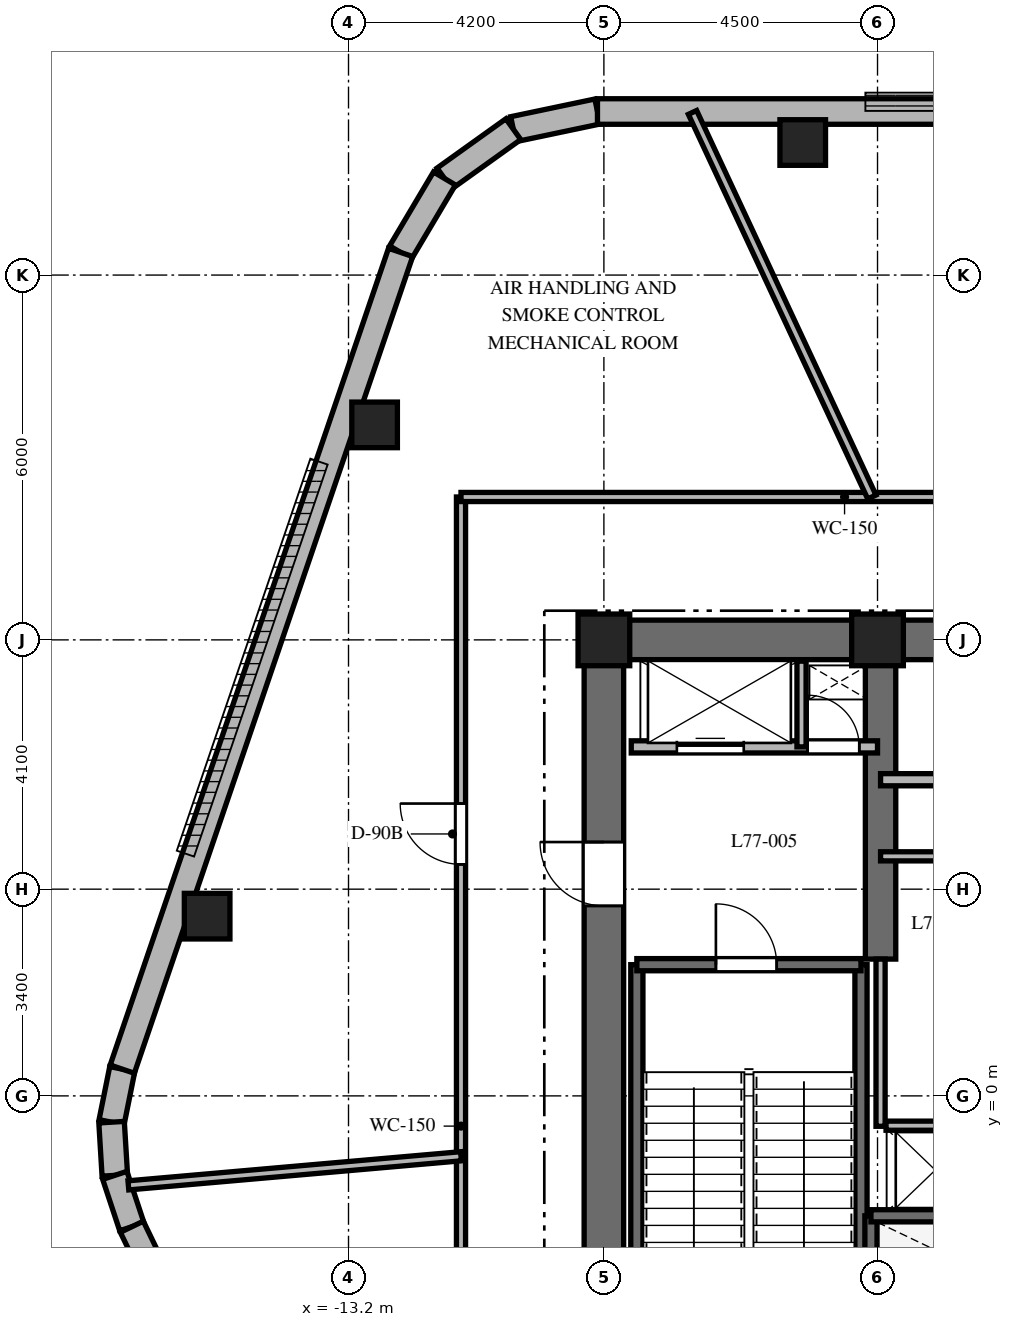
"""IFC4 building model, lengths in metres.
Left out: names, types, materials, properties, quantities, classifications, styles, units other than length and angle.
Written with IfcOpenShell. Run it as: python <this file> out.ifc"""

import sys

from ifc_helpers import new_model, si_unit, direction, frame, frame_2d, origin, origin_2d, place, context, subcontext, project, spatial, rectangle, extrude, element, fill, save


model = new_model("IFC4")
c1 = context("Model", 3, precision=1e-05, world=origin(), true_north=direction((0.0, 1.0)))
c2 = subcontext(c1, "Body", "Model", "MODEL_VIEW")
j1 = project(units=[si_unit("LENGTHUNIT", "METRE"), si_unit("PLANEANGLEUNIT", "RADIAN")], contexts=[c1])
p1 = place(None, origin())
s1 = spatial("IfcSite", under=j1, at=p1, CompositionType="ELEMENT")
p2 = place(p1, origin())
s2 = spatial("IfcBuilding", under=s1, at=p2, CompositionType="ELEMENT")
p3 = place(p2, frame((0.0, 0.0, 310.4)))
s3 = spatial("IfcBuildingStorey", under=s2, at=p3, CompositionType="ELEMENT", Elevation=310.4)
p4 = place(p3, frame((-9.325, 7.5, 0.0), z_axis=(0.0, 0.0, 1.0), x_axis=(1.0, 0.0, 0.0)))
e1 = element("IfcWall", 1, at=p4, inside=s3, PredefinedType="SHEAR", context=c2, shape_type="SweptSolid", body=[
    extrude(rectangle(XDim=9.375, YDim=0.65, at=frame_2d((4.688, 0.0))), origin(), (0.0, 0.0, 1.0), 5.5),
])
p5 = place(p3, frame((-9.0, -7.175, 0.0), z_axis=(0.0, 0.0, 1.0), x_axis=(0.0, 1.0, 0.0)))
e2 = element("IfcWall", 2, at=p5, inside=s3, PredefinedType="SHEAR", context=c2, shape_type="SweptSolid", body=[
    extrude(rectangle(XDim=14.35, YDim=0.65, at=frame_2d((7.175, 0.0))), origin(), (0.0, 0.0, 1.0), 5.5),
])
p6 = place(p5, frame((10.3, 0.0, 0.0)))
e3 = element("IfcOpeningElement", 3, at=p6, cuts=e2, PredefinedType="OPENING", context=c2, shape_type="SweptSolid", body=[
    extrude(rectangle(XDim=1.05, YDim=2.15, at=frame_2d((0.525, 1.075))), frame((0.0, 0.335, 0.0), z_axis=(0.0, -1.0, 0.0), x_axis=(1.0, 0.0, 0.0)), (0.0, 0.0, 1.0), 0.67),
])
p7 = place(p3, frame((-4.45, 2.25, 0.0), z_axis=(0.0, 0.0, 1.0), x_axis=(0.0, 1.0, 0.0)))
e4 = element("IfcWall", 4, at=p7, inside=s3, PredefinedType="SHEAR", context=c2, shape_type="SweptSolid", body=[
    extrude(rectangle(XDim=4.925, YDim=0.5, at=frame_2d((2.462, 0.0))), origin(), (0.0, 0.0, 1.0), 5.5),
])
for number, where, z_axis, x_axis in (
    (5, (-8.458, -6.985, 0.0), (0.0, 0.0, 1.0), (0.0, 1.0, 0.0)),
    (6, (-4.772, -6.985, 0.0), (0.0, 0.0, 1.0), (0.0, 1.0, 0.0)),
):
    element("IfcWall", number, at=place(p3, frame(where, z_axis=z_axis, x_axis=x_axis)), inside=s3, PredefinedType="SHEAR", context=c2, shape_type="SweptSolid", body=[
        extrude(rectangle(XDim=9.143, YDim=0.2, at=frame_2d((4.572, 0.0))), origin(), (0.0, 0.0, 1.0), 5.5),
    ])
p8 = place(p3, frame((-8.458, 2.158, 0.0), z_axis=(0.0, 0.0, 1.0), x_axis=(1.0, 0.0, 0.0)))
e7 = element("IfcWall", 7, at=p8, inside=s3, PredefinedType="SHEAR", context=c2, shape_type="SweptSolid", body=[
    extrude(rectangle(XDim=3.686, YDim=0.2, at=frame_2d((1.843, 0.0))), origin(), (0.0, 0.0, 1.0), 5.5),
])
p9 = place(p8, frame((1.3, 0.0, 0.0)))
e8 = element("IfcOpeningElement", 8, at=p9, cuts=e7, PredefinedType="OPENING", context=c2, shape_type="SweptSolid", body=[
    extrude(rectangle(XDim=1.0, YDim=2.15, at=frame_2d((0.5, 1.075))), frame((0.0, 0.11, 0.0), z_axis=(0.0, -1.0, 0.0), x_axis=(1.0, 0.0, 0.0)), (0.0, 0.0, 1.0), 0.22),
])
p10 = place(p3, frame((-4.608, -5.658, 0.0), z_axis=(0.0, 0.0, 1.0), x_axis=(0.0, 1.0, 0.0)))
e9 = element("IfcWall", 9, at=p10, inside=s3, PredefinedType="SHEAR", context=c2, shape_type="SweptSolid", body=[
    extrude(rectangle(XDim=3.686, YDim=0.2, at=frame_2d((1.843, 0.0))), origin(), (0.0, 0.0, 1.0), 5.5),
])
p11 = place(p3, frame((-4.608, -1.972, 0.0), z_axis=(0.0, 0.0, 1.0), x_axis=(1.0, 0.0, 0.0)))
e10 = element("IfcWall", 10, at=p11, inside=s3, PredefinedType="SHEAR", context=c2, shape_type="SweptSolid", body=[
    extrude(rectangle(XDim=9.166, YDim=0.2, at=frame_2d((4.583, 0.0))), origin(), (0.0, 0.0, 1.0), 5.5),
])
for number, where, z_axis, x_axis in (
    (11, (-4.5, 7.5, 0.0), (0.0, 0.0, 1.0), (1.0, 0.0, 0.0)),
    (12, (-9.0, 7.5, 0.0), (0.0, 0.0, 1.0), (1.0, 0.0, 0.0)),
):
    element("IfcColumn", number, at=place(p3, frame(where, z_axis=z_axis, x_axis=x_axis)), inside=s3, PredefinedType="COLUMN", context=c2, shape_type="SweptSolid", body=[
        extrude(rectangle(XDim=0.85, YDim=0.85, at=origin_2d()), origin(), (0.0, 0.0, 1.0), 5.5),
    ])
for number, where, z_axis, x_axis in (
    (13, (-5.73, 15.68, 0.0), (0.0, 0.0, 1.0), (1.0, 0.0, 0.0)),
    (14, (-12.771, 11.036, 0.0), (0.0, 0.0, 1.0), (1.0, 0.0, 0.0)),
    (15, (-15.525, 2.956, 0.0), (0.0, 0.0, 1.0), (1.0, 0.0, 0.0)),
):
    element("IfcColumn", number, at=place(p3, frame(where, z_axis=z_axis, x_axis=x_axis)), inside=s3, PredefinedType="COLUMN", context=c2, shape_type="SweptSolid", body=[
        extrude(rectangle(XDim=0.75, YDim=0.75, at=origin_2d()), origin(), (0.0, 0.0, 1.0), 5.5),
    ])
p12 = place(p3, frame((-9.106, 16.19, 0.0), z_axis=(0.0, 0.0, 1.0), x_axis=(-0.978670507127, -0.205436215114, 0.0)))
e16 = element("IfcWall", 16, at=p12, inside=s3, PredefinedType="SOLIDWALL", context=c2, shape_type="SweptSolid", body=[
    extrude(rectangle(XDim=1.414, YDim=0.42, at=frame_2d((0.707, 0.0))), origin(), (0.0, 0.0, 1.0), 5.18),
])
p13 = place(p3, frame((-10.49, 15.899, 0.0), z_axis=(0.0, 0.0, 1.0), x_axis=(-0.813104912719, -0.58211717112, 0.0)))
e17 = element("IfcWall", 17, at=p13, inside=s3, PredefinedType="SOLIDWALL", context=c2, shape_type="SweptSolid", body=[
    extrude(rectangle(XDim=1.392, YDim=0.42, at=frame_2d((0.696, 0.0))), origin(), (0.0, 0.0, 1.0), 5.18),
])
p14 = place(p3, frame((-11.622, 15.089, 0.0), z_axis=(0.0, 0.0, 1.0), x_axis=(-0.510403153597, -0.859935242212, 0.0)))
e18 = element("IfcWall", 18, at=p14, inside=s3, PredefinedType="SOLIDWALL", context=c2, shape_type="SweptSolid", body=[
    extrude(rectangle(XDim=1.414, YDim=0.42, at=frame_2d((0.707, 0.0))), origin(), (0.0, 0.0, 1.0), 5.18),
])
p15 = place(p3, frame((-16.921, 0.44, 0.0), z_axis=(0.0, 0.0, 1.0), x_axis=(-0.197170749138, -0.980369162961, 0.0)))
e19 = element("IfcWall", 19, at=p15, inside=s3, PredefinedType="SOLIDWALL", context=c2, shape_type="SweptSolid", body=[
    extrude(rectangle(XDim=0.89, YDim=0.42, at=frame_2d((0.445, 0.0))), origin(), (0.0, 0.0, 1.0), 5.18),
])
p16 = place(p3, frame((-17.096, -0.433, 0.0), z_axis=(0.0, 0.0, 1.0), x_axis=(0.060469820114, -0.998170026025, 0.0)))
e20 = element("IfcWall", 20, at=p16, inside=s3, PredefinedType="SOLIDWALL", context=c2, shape_type="SweptSolid", body=[
    extrude(rectangle(XDim=0.876, YDim=0.42, at=frame_2d((0.438, 0.0))), origin(), (0.0, 0.0, 1.0), 5.18),
])
p17 = place(p3, frame((-17.043, -1.307, 0.0), z_axis=(0.0, 0.0, 1.0), x_axis=(0.314581701602, -0.949230400386, 0.0)))
e21 = element("IfcWall", 21, at=p17, inside=s3, PredefinedType="SOLIDWALL", context=c2, shape_type="SweptSolid", body=[
    extrude(rectangle(XDim=0.89, YDim=0.42, at=frame_2d((0.445, 0.0))), origin(), (0.0, 0.0, 1.0), 5.18),
])
p18 = place(p3, frame((7.84, 16.19, 0.0), z_axis=(0.0, 0.0, 1.0), x_axis=(-1.0, 0.0, 0.0)))
e22 = element("IfcWall", 22, at=p18, inside=s3, PredefinedType="SOLIDWALL", context=c2, shape_type="SweptSolid", body=[
    extrude(rectangle(XDim=16.946, YDim=0.42, at=frame_2d((8.473, 0.0))), origin(), (0.0, 0.0, 1.0), 5.18),
])
p19 = place(p3, frame((-12.344, 13.873, 0.0), z_axis=(0.0, 0.0, 1.0), x_axis=(-0.322553427155, -0.946551259378, 0.0)))
e23 = element("IfcWall", 23, at=p19, inside=s3, PredefinedType="SOLIDWALL", context=c2, shape_type="SweptSolid", body=[
    extrude(rectangle(XDim=14.191, YDim=0.42, at=frame_2d((7.096, 0.0))), origin(), (0.0, 0.0, 1.0), 5.18),
])
p20 = place(p3, frame((-16.763, -2.152, 0.0), z_axis=(0.0, 0.0, 1.0), x_axis=(0.434664735238, -0.900592342817, 0.0)))
e24 = element("IfcWall", 24, at=p20, inside=s3, PredefinedType="SOLIDWALL", context=c2, shape_type="SweptSolid", body=[
    extrude(rectangle(XDim=13.44, YDim=0.42, at=frame_2d((6.72, 0.0))), origin(), (0.0, 0.0, 1.0), 5.18),
])
p21 = place(p3, frame((-8.55, 5.74, 0.0), z_axis=(0.0, 0.0, 1.0), x_axis=(1.0, 0.0, 0.0)))
e25 = element("IfcWall", 25, at=p21, inside=s3, PredefinedType="PARTITIONING", context=c2, shape_type="SweptSolid", body=[
    extrude(rectangle(XDim=4.05, YDim=0.2, at=frame_2d((2.025, 0.0))), origin(), (0.0, 0.0, 1.0), 5.18),
])
p22 = place(p21, frame((0.75, 0.0, 0.0)))
e26 = element("IfcOpeningElement", 26, at=p22, cuts=e25, PredefinedType="OPENING", context=c2, shape_type="SweptSolid", body=[
    extrude(rectangle(XDim=1.1, YDim=2.2, at=frame_2d((0.55, 1.1))), frame((0.0, 0.11, 0.0), z_axis=(0.0, -1.0, 0.0), x_axis=(1.0, 0.0, 0.0)), (0.0, 0.0, 1.0), 0.22),
])
p23 = place(p21, frame((2.9, 0.0, 0.0)))
e27 = element("IfcOpeningElement", 27, at=p23, cuts=e25, PredefinedType="OPENING", context=c2, shape_type="SweptSolid", body=[
    extrude(rectangle(XDim=0.85, YDim=2.03, at=frame_2d((0.425, 1.015))), frame((0.0, 0.11, 0.0), z_axis=(0.0, -1.0, 0.0), x_axis=(1.0, 0.0, 0.0)), (0.0, 0.0, 1.0), 0.22),
])
p24 = place(p3, frame((-5.75, 5.74, 0.0), z_axis=(0.0, 0.0, 1.0), x_axis=(0.0, 1.0, 0.0)))
e28 = element("IfcWall", 28, at=p24, inside=s3, PredefinedType="PARTITIONING", context=c2, shape_type="SweptSolid", body=[
    extrude(rectangle(XDim=1.41, YDim=0.15, at=frame_2d((0.705, 0.0))), origin(), (0.0, 0.0, 1.0), 5.18),
])
p25 = place(p3, frame((-4.45, 5.2, 0.0), z_axis=(0.0, 0.0, 1.0), x_axis=(1.0, 0.0, 0.0)))
e29 = element("IfcWall", 29, at=p25, inside=s3, PredefinedType="PARTITIONING", context=c2, shape_type="SweptSolid", body=[
    extrude(rectangle(XDim=4.5, YDim=0.2, at=frame_2d((2.25, 0.0))), origin(), (0.0, 0.0, 1.0), 5.18),
])
p26 = place(p3, frame((-4.45, -0.5, 0.0), z_axis=(0.0, 0.0, 1.0), x_axis=(0.0, 1.0, 0.0)))
e30 = element("IfcWall", 30, at=p26, inside=s3, PredefinedType="PARTITIONING", context=c2, shape_type="SweptSolid", body=[
    extrude(rectangle(XDim=2.75, YDim=0.15, at=frame_2d((1.375, 0.0))), origin(), (0.0, 0.0, 1.0), 5.18),
])
p27 = place(p3, frame((-4.45, 3.94, 0.0), z_axis=(0.0, 0.0, 1.0), x_axis=(1.0, 0.0, 0.0)))
e31 = element("IfcWall", 31, at=p27, inside=s3, PredefinedType="PARTITIONING", context=c2, shape_type="SweptSolid", body=[
    extrude(rectangle(XDim=2.55, YDim=0.15, at=frame_2d((1.275, 0.0))), origin(), (0.0, 0.0, 1.0), 5.18),
])
p28 = place(p3, frame((-4.36, -0.49, 0.0), z_axis=(0.0, 0.0, 1.0), x_axis=(1.0, 0.0, 0.0)))
e32 = element("IfcWall", 32, at=p28, inside=s3, PredefinedType="PARTITIONING", context=c2, shape_type="SweptSolid", body=[
    extrude(rectangle(XDim=8.72, YDim=0.15, at=frame_2d((4.36, 0.0))), origin(), (0.0, 0.0, 1.0), 5.18),
])
p29 = place(p28, frame((3.86, 0.0, 0.0)))
e33 = element("IfcOpeningElement", 33, at=p29, cuts=e32, PredefinedType="OPENING", context=c2, shape_type="SweptSolid", body=[
    extrude(rectangle(XDim=0.9, YDim=2.03, at=frame_2d((0.45, 1.015))), frame((0.0, 0.085, 0.0), z_axis=(0.0, -1.0, 0.0), x_axis=(1.0, 0.0, 0.0)), (0.0, 0.0, 1.0), 0.17),
])
p30 = place(p3, frame((-11.35, -9.85, 0.0), z_axis=(0.0, 0.0, 1.0), x_axis=(0.0, 1.0, 0.0)))
e34 = element("IfcWall", 34, at=p30, inside=s3, PredefinedType="PARTITIONING", context=c2, shape_type="SweptSolid", body=[
    extrude(rectangle(XDim=19.7, YDim=0.15, at=frame_2d((9.85, 0.0))), origin(), (0.0, 0.0, 1.0), 4.67),
])
p31 = place(p30, frame((13.658, 0.0, 0.0)))
e35 = element("IfcOpeningElement", 35, at=p31, cuts=e34, PredefinedType="OPENING", context=c2, shape_type="SweptSolid", body=[
    extrude(rectangle(XDim=1.0, YDim=2.15, at=frame_2d((0.5, 1.075))), frame((0.0, 0.085, 0.0), z_axis=(0.0, -1.0, 0.0), x_axis=(1.0, 0.0, 0.0)), (0.0, 0.0, 1.0), 0.17),
])
p32 = place(p30, frame((4.048, 0.0, 0.0)))
e36 = element("IfcOpeningElement", 36, at=p32, cuts=e34, PredefinedType="OPENING", context=c2, shape_type="SweptSolid", body=[
    extrude(rectangle(XDim=1.0, YDim=2.15, at=frame_2d((0.5, 1.075))), frame((0.0, 0.085, 0.0), z_axis=(0.0, -1.0, 0.0), x_axis=(1.0, 0.0, 0.0)), (0.0, 0.0, 1.0), 0.17),
])
p33 = place(p3, frame((-11.35, 9.85, 0.0), z_axis=(0.0, 0.0, 1.0), x_axis=(1.0, 0.0, 0.0)))
e37 = element("IfcWall", 37, at=p33, inside=s3, PredefinedType="PARTITIONING", context=c2, shape_type="SweptSolid", body=[
    extrude(rectangle(XDim=22.7, YDim=0.15, at=frame_2d((11.35, 0.0))), origin(), (0.0, 0.0, 1.0), 4.67),
])
p34 = place(p33, frame((13.516, 0.0, 0.0)))
e38 = element("IfcOpeningElement", 38, at=p34, cuts=e37, PredefinedType="OPENING", context=c2, shape_type="SweptSolid", body=[
    extrude(rectangle(XDim=1.0, YDim=2.15, at=frame_2d((0.5, 1.075))), frame((0.0, 0.085, 0.0), z_axis=(0.0, -1.0, 0.0), x_axis=(1.0, 0.0, 0.0)), (0.0, 0.0, 1.0), 0.17),
])
p35 = place(p3, frame((-4.593, 9.85, 0.0), z_axis=(0.0, 0.0, 1.0), x_axis=(-0.422628821743, 0.906302862752, 0.0)))
e39 = element("IfcWall", 39, at=p35, inside=s3, PredefinedType="PARTITIONING", context=c2, shape_type="SweptSolid", body=[
    extrude(rectangle(XDim=6.979, YDim=0.15, at=frame_2d((3.489, 0.0))), origin(), (0.0, 0.0, 1.0), 4.52),
])
p36 = place(p3, frame((-11.35, -0.993, 0.0), z_axis=(0.0, 0.0, 1.0), x_axis=(-0.996191883408, -0.087187908746, 0.0)))
e40 = element("IfcWall", 40, at=p36, inside=s3, PredefinedType="PARTITIONING", context=c2, shape_type="SweptSolid", body=[
    extrude(rectangle(XDim=5.491, YDim=0.15, at=frame_2d((2.746, 0.0))), origin(), (0.0, 0.0, 1.0), 4.52),
])
p37 = place(p9, origin())
e41 = element("IfcDoor", 41, at=p37, inside=s3, OperationType="SINGLE_SWING_LEFT", PredefinedType="DOOR", context=c2, shape_type="SweptSolid", body=[
    extrude(rectangle(XDim=1.0, YDim=2.15, at=frame_2d((0.5, 1.075))), frame((0.0, 0.025, 0.0), z_axis=(0.0, -1.0, 0.0), x_axis=(1.0, 0.0, 0.0)), (0.0, 0.0, 1.0), 0.05),
])
fill(e8, e41)
p38 = place(p6, origin())
e42 = element("IfcDoor", 42, at=p38, inside=s3, OperationType="SINGLE_SWING_RIGHT", PredefinedType="DOOR", context=c2, shape_type="SweptSolid", body=[
    extrude(rectangle(XDim=1.05, YDim=2.15, at=frame_2d((0.525, 1.075))), frame((0.0, 0.025, 0.0), z_axis=(0.0, -1.0, 0.0), x_axis=(1.0, 0.0, 0.0)), (0.0, 0.0, 1.0), 0.05),
])
fill(e3, e42)
p39 = place(p22, origin())
e43 = element("IfcDoor", 43, at=p39, inside=s3, OperationType="SLIDING_TO_LEFT", PredefinedType="DOOR", context=c2, shape_type="SweptSolid", body=[
    extrude(rectangle(XDim=1.1, YDim=2.2, at=frame_2d((0.55, 1.1))), frame((0.0, 0.025, 0.0), z_axis=(0.0, -1.0, 0.0), x_axis=(1.0, 0.0, 0.0)), (0.0, 0.0, 1.0), 0.05),
])
fill(e26, e43)
p40 = place(p23, origin())
e44 = element("IfcDoor", 44, at=p40, inside=s3, OperationType="SINGLE_SWING_LEFT", PredefinedType="DOOR", context=c2, shape_type="SweptSolid", body=[
    extrude(rectangle(XDim=0.85, YDim=2.03, at=frame_2d((0.425, 1.015))), frame((0.0, 0.025, 0.0), z_axis=(0.0, -1.0, 0.0), x_axis=(1.0, 0.0, 0.0)), (0.0, 0.0, 1.0), 0.05),
])
fill(e27, e44)
p41 = place(p31, origin())
e45 = element("IfcDoor", 45, at=p41, inside=s3, OperationType="SINGLE_SWING_RIGHT", PredefinedType="DOOR", context=c2, shape_type="SweptSolid", body=[
    extrude(rectangle(XDim=1.0, YDim=2.15, at=frame_2d((0.5, 1.075))), frame((0.0, 0.025, 0.0), z_axis=(0.0, -1.0, 0.0), x_axis=(1.0, 0.0, 0.0)), (0.0, 0.0, 1.0), 0.05),
])
fill(e35, e45)
save(model, sys.argv[1])
